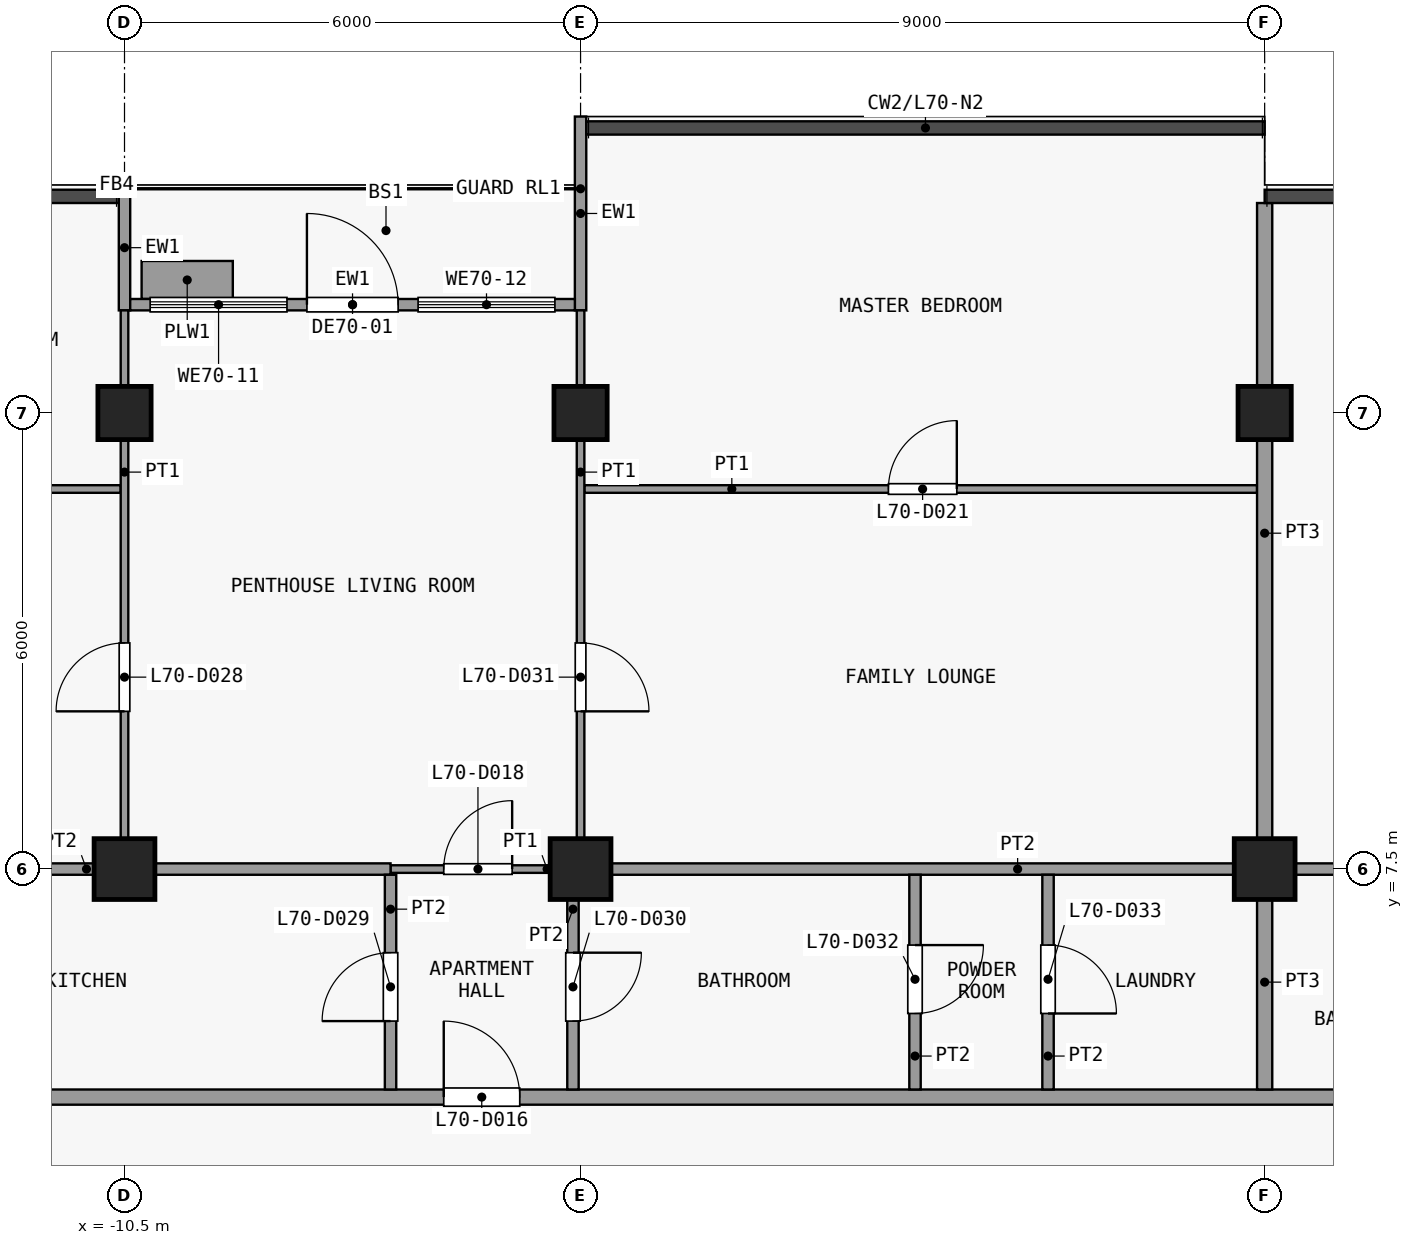
"""IFC4 building model, lengths in metres.
Left out: names, types, materials, properties, quantities, classifications, styles, units other than length and angle.
Written with IfcOpenShell. Run it as: python <this file> out.ifc"""

import sys

from ifc_helpers import new_model, si_unit, direction, frame, frame_2d, origin, origin_2d, place, context, subcontext, project, spatial, rectangle, extrude, element, fill, save


model = new_model("IFC4")
c1 = context("Model", 3, precision=1e-05, world=origin(), true_north=direction((0.0, 1.0)))
c2 = subcontext(c1, "Body", "Model", "MODEL_VIEW")
j1 = project(units=[si_unit("LENGTHUNIT", "METRE"), si_unit("PLANEANGLEUNIT", "RADIAN")], contexts=[c1])
p1 = place(None, origin())
s1 = spatial("IfcSite", under=j1, at=p1, CompositionType="ELEMENT")
p2 = place(p1, origin())
s2 = spatial("IfcBuilding", under=s1, at=p2, CompositionType="ELEMENT")
p3 = place(p2, frame((0.0, 0.0, 277.1)))
s3 = spatial("IfcBuildingStorey", under=s2, at=p3, CompositionType="ELEMENT", Elevation=277.1)
p4 = place(p3, frame((-10.5, 7.5, 0.0), z_axis=(0.0, 0.0, 1.0), x_axis=(1.0, 0.0, 0.0)))
e1 = element("IfcColumn", 1, at=p4, inside=s3, PredefinedType="COLUMN", context=c2, shape_type="SweptSolid", body=[
    extrude(rectangle(XDim=0.8, YDim=0.8, at=origin_2d()), origin(), (0.0, 0.0, 1.0), 3.6),
])
p5 = place(p3, frame((-10.5, 13.5, 0.0), z_axis=(0.0, 0.0, 1.0), x_axis=(1.0, 0.0, 0.0)))
e2 = element("IfcColumn", 2, at=p5, inside=s3, PredefinedType="COLUMN", context=c2, shape_type="SweptSolid", body=[
    extrude(rectangle(XDim=0.7, YDim=0.7, at=origin_2d()), origin(), (0.0, 0.0, 1.0), 3.6),
])
p6 = place(p3, frame((-4.5, 7.5, 0.0), z_axis=(0.0, 0.0, 1.0), x_axis=(1.0, 0.0, 0.0)))
e3 = element("IfcColumn", 3, at=p6, inside=s3, PredefinedType="COLUMN", context=c2, shape_type="SweptSolid", body=[
    extrude(rectangle(XDim=0.8, YDim=0.8, at=origin_2d()), origin(), (0.0, 0.0, 1.0), 3.6),
])
p7 = place(p3, frame((-4.5, 13.5, 0.0), z_axis=(0.0, 0.0, 1.0), x_axis=(1.0, 0.0, 0.0)))
e4 = element("IfcColumn", 4, at=p7, inside=s3, PredefinedType="COLUMN", context=c2, shape_type="SweptSolid", body=[
    extrude(rectangle(XDim=0.7, YDim=0.7, at=origin_2d()), origin(), (0.0, 0.0, 1.0), 3.6),
])
p8 = place(p3, frame((4.5, 7.5, 0.0), z_axis=(0.0, 0.0, 1.0), x_axis=(1.0, 0.0, 0.0)))
e5 = element("IfcColumn", 5, at=p8, inside=s3, PredefinedType="COLUMN", context=c2, shape_type="SweptSolid", body=[
    extrude(rectangle(XDim=0.8, YDim=0.8, at=origin_2d()), origin(), (0.0, 0.0, 1.0), 3.6),
])
p9 = place(p3, frame((4.5, 13.5, 0.0), z_axis=(0.0, 0.0, 1.0), x_axis=(1.0, 0.0, 0.0)))
e6 = element("IfcColumn", 6, at=p9, inside=s3, PredefinedType="COLUMN", context=c2, shape_type="SweptSolid", body=[
    extrude(rectangle(XDim=0.7, YDim=0.7, at=origin_2d()), origin(), (0.0, 0.0, 1.0), 3.6),
])
p10 = place(p3, frame((-10.5, 14.85, 0.0), z_axis=(0.0, 0.0, 1.0), x_axis=(0.0, 1.0, 0.0)))
e7 = element("IfcWall", 7, at=p10, inside=s3, PredefinedType="SOLIDWALL", context=c2, shape_type="SweptSolid", body=[
    extrude(rectangle(XDim=1.65, YDim=0.15, at=frame_2d((0.825, 0.0))), origin(), (0.0, 0.0, 1.0), 3.3),
])
p11 = place(p3, frame((-4.5, 14.85, 0.0), z_axis=(0.0, 0.0, 1.0), x_axis=(0.0, 1.0, 0.0)))
e8 = element("IfcWall", 8, at=p11, inside=s3, PredefinedType="SOLIDWALL", context=c2, shape_type="SweptSolid", body=[
    extrude(rectangle(XDim=2.55, YDim=0.15, at=frame_2d((1.275, 0.0))), origin(), (0.0, 0.0, 1.0), 3.3),
])
p12 = place(p3, frame((-10.425, 14.925, 0.0), z_axis=(0.0, 0.0, 1.0), x_axis=(1.0, 0.0, 0.0)))
e9 = element("IfcWall", 9, at=p12, inside=s3, PredefinedType="SOLIDWALL", context=c2, shape_type="SweptSolid", body=[
    extrude(rectangle(XDim=5.85, YDim=0.15, at=frame_2d((2.925, 0.0))), origin(), (0.0, 0.0, 1.0), 3.3),
])
p13 = place(p12, frame((2.325, 0.0, 0.0)))
e10 = element("IfcOpeningElement", 10, at=p13, cuts=e9, PredefinedType="OPENING", context=c2, shape_type="SweptSolid", body=[
    extrude(rectangle(XDim=1.2, YDim=2.4, at=frame_2d((0.6, 1.2))), frame((0.0, 0.085, 0.0), z_axis=(0.0, -1.0, 0.0), x_axis=(1.0, 0.0, 0.0)), (0.0, 0.0, 1.0), 0.17),
])
p14 = place(p12, frame((0.262, 0.0, 0.9)))
e11 = element("IfcOpeningElement", 11, at=p14, cuts=e9, PredefinedType="OPENING", context=c2, shape_type="SweptSolid", body=[
    extrude(rectangle(XDim=1.8, YDim=2.1, at=frame_2d((0.9, 1.05))), frame((0.0, 0.085, 0.0), z_axis=(0.0, -1.0, 0.0), x_axis=(1.0, 0.0, 0.0)), (0.0, 0.0, 1.0), 0.17),
])
p15 = place(p12, frame((3.788, 0.0, 0.9)))
e12 = element("IfcOpeningElement", 12, at=p15, cuts=e9, PredefinedType="OPENING", context=c2, shape_type="SweptSolid", body=[
    extrude(rectangle(XDim=1.8, YDim=2.1, at=frame_2d((0.9, 1.05))), frame((0.0, 0.085, 0.0), z_axis=(0.0, -1.0, 0.0), x_axis=(1.0, 0.0, 0.0)), (0.0, 0.0, 1.0), 0.17),
])
p16 = place(p3, frame((-10.275, 15.25, 0.0), z_axis=(0.0, 0.0, 1.0), x_axis=(1.0, 0.0, 0.0)))
e13 = element("IfcWall", 13, at=p16, inside=s3, PredefinedType="USERDEFINED", context=c2, shape_type="SweptSolid", body=[
    extrude(rectangle(XDim=1.2, YDim=0.5, at=frame_2d((0.6, 0.0))), origin(), (0.0, 0.0, 1.0), 0.9),
])
p17 = place(p3, frame((-19.35, 4.5, 0.0), z_axis=(0.0, 0.0, 1.0), x_axis=(1.0, 0.0, 0.0)))
e14 = element("IfcWall", 14, at=p17, inside=s3, PredefinedType="PARTITIONING", context=c2, shape_type="SweptSolid", body=[
    extrude(rectangle(XDim=38.7, YDim=0.2, at=frame_2d((19.35, 0.0))), origin(), (0.0, 0.0, 1.0), 3.3),
])
p18 = place(p17, frame((13.05, 0.0, 0.0)))
e15 = element("IfcOpeningElement", 15, at=p18, cuts=e14, PredefinedType="OPENING", context=c2, shape_type="SweptSolid", body=[
    extrude(rectangle(XDim=1.0, YDim=2.1, at=frame_2d((0.5, 1.05))), frame((0.0, 0.11, 0.0), z_axis=(0.0, -1.0, 0.0), x_axis=(1.0, 0.0, 0.0)), (0.0, 0.0, 1.0), 0.22),
])
p19 = place(p17, frame((27.05, 0.0, 0.0)))
e16 = element("IfcOpeningElement", 16, at=p19, cuts=e14, PredefinedType="OPENING", context=c2, shape_type="SweptSolid", body=[
    extrude(rectangle(XDim=1.0, YDim=2.1, at=frame_2d((0.5, 1.05))), frame((0.0, 0.11, 0.0), z_axis=(0.0, -1.0, 0.0), x_axis=(1.0, 0.0, 0.0)), (0.0, 0.0, 1.0), 0.22),
])
p20 = place(p3, frame((-7.0, 7.5, 0.0), z_axis=(0.0, 0.0, 1.0), x_axis=(1.0, 0.0, 0.0)))
e17 = element("IfcWall", 17, at=p20, inside=s3, PredefinedType="PARTITIONING", context=c2, shape_type="SweptSolid", body=[
    extrude(rectangle(XDim=2.4, YDim=0.1, at=frame_2d((1.2, 0.0))), origin(), (0.0, 0.0, 1.0), 3.3),
])
p21 = place(p20, frame((0.7, 0.0, 0.0)))
e18 = element("IfcOpeningElement", 18, at=p21, cuts=e17, PredefinedType="OPENING", context=c2, shape_type="SweptSolid", body=[
    extrude(rectangle(XDim=0.9, YDim=2.1, at=frame_2d((0.45, 1.05))), frame((0.0, 0.06, 0.0), z_axis=(0.0, -1.0, 0.0), x_axis=(1.0, 0.0, 0.0)), (0.0, 0.0, 1.0), 0.12),
])
p22 = place(p3, frame((-15.0, 7.5, 0.0), z_axis=(0.0, 0.0, 1.0), x_axis=(1.0, 0.0, 0.0)))
e19 = element("IfcWall", 19, at=p22, inside=s3, PredefinedType="PARTITIONING", context=c2, shape_type="SweptSolid", body=[
    extrude(rectangle(XDim=8.0, YDim=0.15, at=frame_2d((4.0, 0.0))), origin(), (0.0, 0.0, 1.0), 3.3),
])
p23 = place(p3, frame((-4.5, 7.5, 0.0), z_axis=(0.0, 0.0, 1.0), x_axis=(1.0, 0.0, 0.0)))
e20 = element("IfcWall", 20, at=p23, inside=s3, PredefinedType="PARTITIONING", context=c2, shape_type="SweptSolid", body=[
    extrude(rectangle(XDim=11.5, YDim=0.15, at=frame_2d((5.75, 0.0))), origin(), (0.0, 0.0, 1.0), 3.3),
])
p24 = place(p3, frame((-14.35, 12.5, 0.0), z_axis=(0.0, 0.0, 1.0), x_axis=(1.0, 0.0, 0.0)))
e21 = element("IfcWall", 21, at=p24, inside=s3, PredefinedType="PARTITIONING", context=c2, shape_type="SweptSolid", body=[
    extrude(rectangle(XDim=3.8, YDim=0.1, at=frame_2d((1.9, 0.0))), origin(), (0.0, 0.0, 1.0), 3.3),
])
p25 = place(p24, frame((1.5, 0.0, 0.0)))
e22 = element("IfcOpeningElement", 22, at=p25, cuts=e21, PredefinedType="OPENING", context=c2, shape_type="SweptSolid", body=[
    extrude(rectangle(XDim=0.9, YDim=2.1, at=frame_2d((0.45, 1.05))), frame((0.0, 0.06, 0.0), z_axis=(0.0, -1.0, 0.0), x_axis=(1.0, 0.0, 0.0)), (0.0, 0.0, 1.0), 0.12),
])
p26 = place(p3, frame((-4.45, 12.5, 0.0), z_axis=(0.0, 0.0, 1.0), x_axis=(1.0, 0.0, 0.0)))
e23 = element("IfcWall", 23, at=p26, inside=s3, PredefinedType="PARTITIONING", context=c2, shape_type="SweptSolid", body=[
    extrude(rectangle(XDim=8.85, YDim=0.1, at=frame_2d((4.425, 0.0))), origin(), (0.0, 0.0, 1.0), 3.3),
])
p27 = place(p26, frame((4.0, 0.0, 0.0)))
e24 = element("IfcOpeningElement", 24, at=p27, cuts=e23, PredefinedType="OPENING", context=c2, shape_type="SweptSolid", body=[
    extrude(rectangle(XDim=0.9, YDim=2.1, at=frame_2d((0.45, 1.05))), frame((0.0, 0.06, 0.0), z_axis=(0.0, -1.0, 0.0), x_axis=(1.0, 0.0, 0.0)), (0.0, 0.0, 1.0), 0.12),
])
p28 = place(p3, frame((-10.5, 7.575, 0.0), z_axis=(0.0, 0.0, 1.0), x_axis=(0.0, 1.0, 0.0)))
e25 = element("IfcWall", 25, at=p28, inside=s3, PredefinedType="PARTITIONING", context=c2, shape_type="SweptSolid", body=[
    extrude(rectangle(XDim=7.275, YDim=0.1, at=frame_2d((3.638, 0.0))), origin(), (0.0, 0.0, 1.0), 3.3),
])
p29 = place(p28, frame((2.0, 0.0, 0.0)))
e26 = element("IfcOpeningElement", 26, at=p29, cuts=e25, PredefinedType="OPENING", context=c2, shape_type="SweptSolid", body=[
    extrude(rectangle(XDim=0.9, YDim=2.1, at=frame_2d((0.45, 1.05))), frame((0.0, 0.06, 0.0), z_axis=(0.0, -1.0, 0.0), x_axis=(1.0, 0.0, 0.0)), (0.0, 0.0, 1.0), 0.12),
])
p30 = place(p3, frame((-7.0, 4.6, 0.0), z_axis=(0.0, 0.0, 1.0), x_axis=(0.0, 1.0, 0.0)))
e27 = element("IfcWall", 27, at=p30, inside=s3, PredefinedType="PARTITIONING", context=c2, shape_type="SweptSolid", body=[
    extrude(rectangle(XDim=2.825, YDim=0.15, at=frame_2d((1.413, 0.0))), origin(), (0.0, 0.0, 1.0), 3.3),
])
p31 = place(p30, frame((0.9, 0.0, 0.0)))
e28 = element("IfcOpeningElement", 28, at=p31, cuts=e27, PredefinedType="OPENING", context=c2, shape_type="SweptSolid", body=[
    extrude(rectangle(XDim=0.9, YDim=2.1, at=frame_2d((0.45, 1.05))), frame((0.0, 0.085, 0.0), z_axis=(0.0, -1.0, 0.0), x_axis=(1.0, 0.0, 0.0)), (0.0, 0.0, 1.0), 0.17),
])
p32 = place(p3, frame((-4.6, 4.6, 0.0), z_axis=(0.0, 0.0, 1.0), x_axis=(0.0, 1.0, 0.0)))
e29 = element("IfcWall", 29, at=p32, inside=s3, PredefinedType="PARTITIONING", context=c2, shape_type="SweptSolid", body=[
    extrude(rectangle(XDim=2.825, YDim=0.15, at=frame_2d((1.413, 0.0))), origin(), (0.0, 0.0, 1.0), 3.3),
])
p33 = place(p32, frame((0.9, 0.0, 0.0)))
e30 = element("IfcOpeningElement", 30, at=p33, cuts=e29, PredefinedType="OPENING", context=c2, shape_type="SweptSolid", body=[
    extrude(rectangle(XDim=0.9, YDim=2.1, at=frame_2d((0.45, 1.05))), frame((0.0, 0.085, 0.0), z_axis=(0.0, -1.0, 0.0), x_axis=(1.0, 0.0, 0.0)), (0.0, 0.0, 1.0), 0.17),
])
p34 = place(p3, frame((-4.5, 7.575, 0.0), z_axis=(0.0, 0.0, 1.0), x_axis=(0.0, 1.0, 0.0)))
e31 = element("IfcWall", 31, at=p34, inside=s3, PredefinedType="PARTITIONING", context=c2, shape_type="SweptSolid", body=[
    extrude(rectangle(XDim=7.275, YDim=0.1, at=frame_2d((3.638, 0.0))), origin(), (0.0, 0.0, 1.0), 3.3),
])
p35 = place(p34, frame((2.0, 0.0, 0.0)))
e32 = element("IfcOpeningElement", 32, at=p35, cuts=e31, PredefinedType="OPENING", context=c2, shape_type="SweptSolid", body=[
    extrude(rectangle(XDim=0.9, YDim=2.1, at=frame_2d((0.45, 1.05))), frame((0.0, 0.06, 0.0), z_axis=(0.0, -1.0, 0.0), x_axis=(1.0, 0.0, 0.0)), (0.0, 0.0, 1.0), 0.12),
])
p36 = place(p3, frame((-0.1, 4.6, 0.0), z_axis=(0.0, 0.0, 1.0), x_axis=(0.0, 1.0, 0.0)))
e33 = element("IfcWall", 33, at=p36, inside=s3, PredefinedType="PARTITIONING", context=c2, shape_type="SweptSolid", body=[
    extrude(rectangle(XDim=2.825, YDim=0.15, at=frame_2d((1.413, 0.0))), origin(), (0.0, 0.0, 1.0), 3.3),
])
p37 = place(p36, frame((1.0, 0.0, 0.0)))
e34 = element("IfcOpeningElement", 34, at=p37, cuts=e33, PredefinedType="OPENING", context=c2, shape_type="SweptSolid", body=[
    extrude(rectangle(XDim=0.9, YDim=2.1, at=frame_2d((0.45, 1.05))), frame((0.0, 0.085, 0.0), z_axis=(0.0, -1.0, 0.0), x_axis=(1.0, 0.0, 0.0)), (0.0, 0.0, 1.0), 0.17),
])
p38 = place(p3, frame((1.65, 4.6, 0.0), z_axis=(0.0, 0.0, 1.0), x_axis=(0.0, 1.0, 0.0)))
e35 = element("IfcWall", 35, at=p38, inside=s3, PredefinedType="PARTITIONING", context=c2, shape_type="SweptSolid", body=[
    extrude(rectangle(XDim=2.825, YDim=0.15, at=frame_2d((1.413, 0.0))), origin(), (0.0, 0.0, 1.0), 3.3),
])
p39 = place(p38, frame((1.0, 0.0, 0.0)))
e36 = element("IfcOpeningElement", 36, at=p39, cuts=e35, PredefinedType="OPENING", context=c2, shape_type="SweptSolid", body=[
    extrude(rectangle(XDim=0.9, YDim=2.1, at=frame_2d((0.45, 1.05))), frame((0.0, 0.085, 0.0), z_axis=(0.0, -1.0, 0.0), x_axis=(1.0, 0.0, 0.0)), (0.0, 0.0, 1.0), 0.17),
])
p40 = place(p3, frame((4.5, 4.6, 0.0), z_axis=(0.0, 0.0, 1.0), x_axis=(0.0, 1.0, 0.0)))
e37 = element("IfcWall", 37, at=p40, inside=s3, PredefinedType="PARTITIONING", context=c2, shape_type="SweptSolid", body=[
    extrude(rectangle(XDim=2.825, YDim=0.2, at=frame_2d((1.413, 0.0))), origin(), (0.0, 0.0, 1.0), 3.3),
])
p41 = place(p3, frame((4.5, 7.575, 0.0), z_axis=(0.0, 0.0, 1.0), x_axis=(0.0, 1.0, 0.0)))
e38 = element("IfcWall", 38, at=p41, inside=s3, PredefinedType="PARTITIONING", context=c2, shape_type="SweptSolid", body=[
    extrude(rectangle(XDim=8.688, YDim=0.2, at=frame_2d((4.344, 0.0))), origin(), (0.0, 0.0, 1.0), 3.3),
])
p42 = place(p13, origin())
e39 = element("IfcDoor", 39, at=p42, inside=s3, OperationType="SINGLE_SWING_LEFT", PredefinedType="DOOR", context=c2, shape_type="SweptSolid", body=[
    extrude(rectangle(XDim=1.2, YDim=2.4, at=frame_2d((0.6, 1.2))), frame((0.0, 0.025, 0.0), z_axis=(0.0, -1.0, 0.0), x_axis=(1.0, 0.0, 0.0)), (0.0, 0.0, 1.0), 0.05),
])
fill(e10, e39)
p43 = place(p14, origin())
e40 = element("IfcWindow", 40, at=p43, inside=s3, PartitioningType="SINGLE_PANEL", PredefinedType="WINDOW", context=c2, shape_type="SweptSolid", body=[
    extrude(rectangle(XDim=1.8, YDim=2.1, at=frame_2d((0.9, 1.05))), frame((0.0, 0.03, 0.0), z_axis=(0.0, -1.0, 0.0), x_axis=(1.0, 0.0, 0.0)), (0.0, 0.0, 1.0), 0.06),
])
fill(e11, e40)
p44 = place(p15, origin())
e41 = element("IfcWindow", 41, at=p44, inside=s3, PartitioningType="SINGLE_PANEL", PredefinedType="WINDOW", context=c2, shape_type="SweptSolid", body=[
    extrude(rectangle(XDim=1.8, YDim=2.1, at=frame_2d((0.9, 1.05))), frame((0.0, 0.03, 0.0), z_axis=(0.0, -1.0, 0.0), x_axis=(1.0, 0.0, 0.0)), (0.0, 0.0, 1.0), 0.06),
])
fill(e12, e41)
p45 = place(p18, origin())
e42 = element("IfcDoor", 42, at=p45, inside=s3, OperationType="SINGLE_SWING_RIGHT", PredefinedType="DOOR", context=c2, shape_type="SweptSolid", body=[
    extrude(rectangle(XDim=1.0, YDim=2.1, at=frame_2d((0.5, 1.05))), frame((0.0, 0.025, 0.0), z_axis=(0.0, -1.0, 0.0), x_axis=(1.0, 0.0, 0.0)), (0.0, 0.0, 1.0), 0.05),
])
fill(e15, e42)
p46 = place(p21, origin())
e43 = element("IfcDoor", 43, at=p46, inside=s3, OperationType="SINGLE_SWING_LEFT", PredefinedType="DOOR", context=c2, shape_type="SweptSolid", body=[
    extrude(rectangle(XDim=0.9, YDim=2.1, at=frame_2d((0.45, 1.05))), frame((0.0, 0.025, 0.0), z_axis=(0.0, -1.0, 0.0), x_axis=(1.0, 0.0, 0.0)), (0.0, 0.0, 1.0), 0.05),
])
fill(e18, e43)
p47 = place(p27, origin())
e44 = element("IfcDoor", 44, at=p47, inside=s3, OperationType="SINGLE_SWING_LEFT", PredefinedType="DOOR", context=c2, shape_type="SweptSolid", body=[
    extrude(rectangle(XDim=0.9, YDim=2.1, at=frame_2d((0.45, 1.05))), frame((0.0, 0.025, 0.0), z_axis=(0.0, -1.0, 0.0), x_axis=(1.0, 0.0, 0.0)), (0.0, 0.0, 1.0), 0.05),
])
fill(e24, e44)
p48 = place(p29, origin())
e45 = element("IfcDoor", 45, at=p48, inside=s3, OperationType="SINGLE_SWING_RIGHT", PredefinedType="DOOR", context=c2, shape_type="SweptSolid", body=[
    extrude(rectangle(XDim=0.9, YDim=2.1, at=frame_2d((0.45, 1.05))), frame((0.0, 0.025, 0.0), z_axis=(0.0, -1.0, 0.0), x_axis=(1.0, 0.0, 0.0)), (0.0, 0.0, 1.0), 0.05),
])
fill(e26, e45)
p49 = place(p31, origin())
e46 = element("IfcDoor", 46, at=p49, inside=s3, OperationType="SINGLE_SWING_RIGHT", PredefinedType="DOOR", context=c2, shape_type="SweptSolid", body=[
    extrude(rectangle(XDim=0.9, YDim=2.1, at=frame_2d((0.45, 1.05))), frame((0.0, 0.025, 0.0), z_axis=(0.0, -1.0, 0.0), x_axis=(1.0, 0.0, 0.0)), (0.0, 0.0, 1.0), 0.05),
])
fill(e28, e46)
p50 = place(p33, origin())
e47 = element("IfcDoor", 47, at=p50, inside=s3, OperationType="SINGLE_SWING_RIGHT", PredefinedType="DOOR", context=c2, shape_type="SweptSolid", body=[
    extrude(rectangle(XDim=0.9, YDim=2.1, at=frame_2d((0.45, 1.05))), frame((0.0, 0.025, 0.0), z_axis=(0.0, -1.0, 0.0), x_axis=(1.0, 0.0, 0.0)), (0.0, 0.0, 1.0), 0.05),
])
fill(e30, e47)
p51 = place(p35, origin())
e48 = element("IfcDoor", 48, at=p51, inside=s3, OperationType="SINGLE_SWING_LEFT", PredefinedType="DOOR", context=c2, shape_type="SweptSolid", body=[
    extrude(rectangle(XDim=0.9, YDim=2.1, at=frame_2d((0.45, 1.05))), frame((0.0, 0.025, 0.0), z_axis=(0.0, -1.0, 0.0), x_axis=(1.0, 0.0, 0.0)), (0.0, 0.0, 1.0), 0.05),
])
fill(e32, e48)
p52 = place(p37, origin())
e49 = element("IfcDoor", 49, at=p52, inside=s3, OperationType="SINGLE_SWING_RIGHT", PredefinedType="DOOR", context=c2, shape_type="SweptSolid", body=[
    extrude(rectangle(XDim=0.9, YDim=2.1, at=frame_2d((0.45, 1.05))), frame((0.0, 0.025, 0.0), z_axis=(0.0, -1.0, 0.0), x_axis=(1.0, 0.0, 0.0)), (0.0, 0.0, 1.0), 0.05),
])
fill(e34, e49)
p53 = place(p39, origin())
e50 = element("IfcDoor", 50, at=p53, inside=s3, OperationType="SINGLE_SWING_LEFT", PredefinedType="DOOR", context=c2, shape_type="SweptSolid", body=[
    extrude(rectangle(XDim=0.9, YDim=2.1, at=frame_2d((0.45, 1.05))), frame((0.0, 0.025, 0.0), z_axis=(0.0, -1.0, 0.0), x_axis=(1.0, 0.0, 0.0)), (0.0, 0.0, 1.0), 0.05),
])
fill(e36, e50)
save(model, sys.argv[1])
